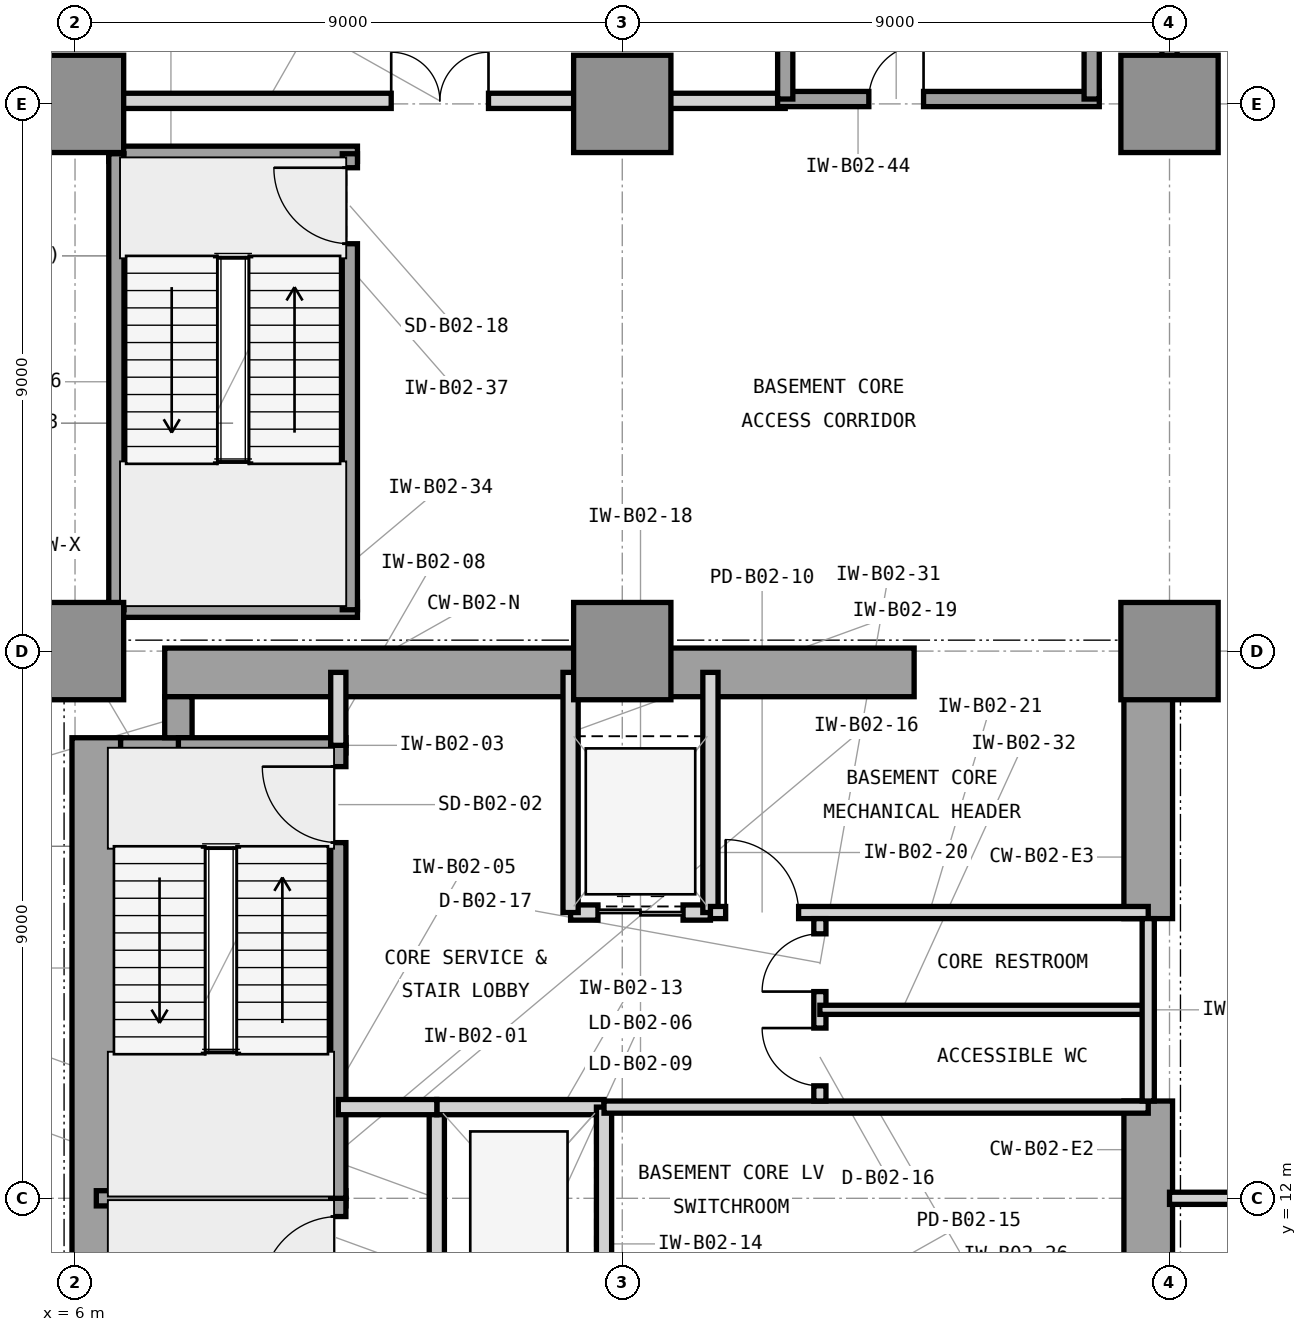
"""IFC4 building model, lengths in metres.
Left out: names, types, materials, properties, quantities, classifications, styles, units other than length and angle.
Written with IfcOpenShell. Run it as: python <this file> out.ifc"""

import sys

from ifc_helpers import new_model, si_unit, direction, frame, frame_2d, origin, origin_2d, place, context, subcontext, project, spatial, rectangle, extrude, element, fill, save


model = new_model("IFC4")
c1 = context("Model", 3, precision=1e-05, world=origin(), true_north=direction((0.0, 1.0)))
c2 = subcontext(c1, "Body", "Model", "MODEL_VIEW")
j1 = project(units=[si_unit("LENGTHUNIT", "METRE"), si_unit("PLANEANGLEUNIT", "RADIAN")], contexts=[c1])
p1 = place(None, origin())
s1 = spatial("IfcSite", under=j1, at=p1, CompositionType="ELEMENT")
p2 = place(p1, origin())
s2 = spatial("IfcBuilding", under=s1, at=p2, CompositionType="ELEMENT")
p3 = place(p2, frame((0.0, 0.0, -9.0)))
s3 = spatial("IfcBuildingStorey", under=s2, at=p3, CompositionType="ELEMENT", Elevation=-9.0)
p4 = place(p3, frame((6.35, 4.425, 0.0), z_axis=(0.0, 0.0, 1.0), x_axis=(0.0, 1.0, 0.0)))
e1 = element("IfcWall", 1, at=p4, inside=s3, PredefinedType="SHEAR", context=c2, shape_type="SweptSolid", body=[
    extrude(rectangle(XDim=15.15, YDim=0.8, at=frame_2d((7.575, 0.0))), origin(), (0.0, 0.0, 1.0), 4.5),
])
p5 = place(p3, frame((7.475, 20.65, 0.0), z_axis=(0.0, 0.0, 1.0), x_axis=(1.0, 0.0, 0.0)))
e2 = element("IfcWall", 2, at=p5, inside=s3, PredefinedType="SHEAR", context=c2, shape_type="SweptSolid", body=[
    extrude(rectangle(XDim=12.325, YDim=0.8, at=frame_2d((6.163, 0.0))), origin(), (0.0, 0.0, 1.0), 4.5),
])
p6 = place(p3, frame((23.65, 10.4, 0.0), z_axis=(0.0, 0.0, 1.0), x_axis=(0.0, 1.0, 0.0)))
e3 = element("IfcWall", 3, at=p6, inside=s3, PredefinedType="SHEAR", context=c2, shape_type="SweptSolid", body=[
    extrude(rectangle(XDim=3.2, YDim=0.8, at=frame_2d((1.6, 0.0))), origin(), (0.0, 0.0, 1.0), 4.5),
])
p7 = place(p3, frame((23.65, 16.6, 0.0), z_axis=(0.0, 0.0, 1.0), x_axis=(0.0, 1.0, 0.0)))
e4 = element("IfcWall", 4, at=p7, inside=s3, PredefinedType="SHEAR", context=c2, shape_type="SweptSolid", body=[
    extrude(rectangle(XDim=4.05, YDim=0.8, at=frame_2d((2.025, 0.0))), origin(), (0.0, 0.0, 1.0), 4.5),
])
p8 = place(p3, frame((6.75, 19.35, 0.0), z_axis=(0.0, 0.0, 1.0), x_axis=(1.0, 0.0, 0.0)))
e5 = element("IfcWall", 5, at=p8, inside=s3, PredefinedType="SHEAR", context=c2, shape_type="SweptSolid", body=[
    extrude(rectangle(XDim=1.175, YDim=0.45, at=frame_2d((0.587, 0.0))), origin(), (0.0, 0.0, 1.0), 4.5),
])
p9 = place(p3, frame((7.7, 19.575, 0.0), z_axis=(0.0, 0.0, 1.0), x_axis=(0.0, 1.0, 0.0)))
e6 = element("IfcWall", 6, at=p9, inside=s3, PredefinedType="SHEAR", context=c2, shape_type="SweptSolid", body=[
    extrude(rectangle(XDim=0.675, YDim=0.45, at=frame_2d((0.337, 0.0))), origin(), (0.0, 0.0, 1.0), 4.5),
])
for number, where, z_axis, x_axis in (
    (7, (6.0, 21.0, 0.0), (0.0, 0.0, 1.0), (1.0, 0.0, 0.0)),
    (8, (6.0, 30.0, 0.0), (0.0, 0.0, 1.0), (1.0, 0.0, 0.0)),
    (9, (15.0, 21.0, 0.0), (0.0, 0.0, 1.0), (1.0, 0.0, 0.0)),
    (10, (15.0, 30.0, 0.0), (0.0, 0.0, 1.0), (1.0, 0.0, 0.0)),
    (11, (24.0, 21.0, 0.0), (0.0, 0.0, 1.0), (1.0, 0.0, 0.0)),
    (12, (24.0, 30.0, 0.0), (0.0, 0.0, 1.0), (1.0, 0.0, 0.0)),
):
    element("IfcColumn", number, at=place(p3, frame(where, z_axis=z_axis, x_axis=x_axis)), inside=s3, PredefinedType="COLUMN", context=c2, shape_type="SweptSolid", body=[
        extrude(rectangle(XDim=1.6, YDim=1.6, at=origin_2d()), origin(), (0.0, 0.0, 1.0), 4.5),
    ])
p10 = place(p3, frame((6.35, 12.0, 0.0), z_axis=(0.0, 0.0, 1.0), x_axis=(1.0, 0.0, 0.0)))
e13 = element("IfcWall", 13, at=p10, inside=s3, PredefinedType="SHEAR", context=c2, shape_type="SweptSolid", body=[
    extrude(rectangle(XDim=4.105, YDim=0.25, at=frame_2d((2.052, 0.0))), origin(), (0.0, 0.0, 1.0), 4.5),
])
p11 = place(p3, frame((7.7, 19.45, 0.0), z_axis=(0.0, 0.0, 1.0), x_axis=(1.0, 0.0, 0.0)))
e14 = element("IfcWall", 14, at=p11, inside=s3, PredefinedType="SHEAR", context=c2, shape_type="SweptSolid", body=[
    extrude(rectangle(XDim=2.755, YDim=0.25, at=frame_2d((1.377, 0.0))), origin(), (0.0, 0.0, 1.0), 4.5),
])
p12 = place(p3, frame((10.33, 4.55, 0.0), z_axis=(0.0, 0.0, 1.0), x_axis=(0.0, 1.0, 0.0)))
e15 = element("IfcWall", 15, at=p12, inside=s3, PredefinedType="SHEAR", context=c2, shape_type="SweptSolid", body=[
    extrude(rectangle(XDim=7.45, YDim=0.25, at=frame_2d((3.725, 0.0))), origin(), (0.0, 0.0, 1.0), 4.5),
])
p13 = place(p12, frame((5.9, 0.0, 0.0)))
e16 = element("IfcOpeningElement", 16, at=p13, cuts=e15, PredefinedType="OPENING", context=c2, shape_type="SweptSolid", body=[
    extrude(rectangle(XDim=1.25, YDim=2.2, at=frame_2d((0.625, 1.1))), frame((0.0, 0.135, 0.0), z_axis=(0.0, -1.0, 0.0), x_axis=(1.0, 0.0, 0.0)), (0.0, 0.0, 1.0), 0.27),
])
p14 = place(p3, frame((10.33, 12.0, 0.0), z_axis=(0.0, 0.0, 1.0), x_axis=(0.0, 1.0, 0.0)))
e17 = element("IfcWall", 17, at=p14, inside=s3, PredefinedType="SHEAR", context=c2, shape_type="SweptSolid", body=[
    extrude(rectangle(XDim=7.45, YDim=0.25, at=frame_2d((3.725, 0.0))), origin(), (0.0, 0.0, 1.0), 4.5),
])
p15 = place(p14, frame((5.85, 0.0, 0.0)))
e18 = element("IfcOpeningElement", 18, at=p15, cuts=e17, PredefinedType="OPENING", context=c2, shape_type="SweptSolid", body=[
    extrude(rectangle(XDim=1.25, YDim=2.2, at=frame_2d((0.625, 1.1))), frame((0.0, 0.135, 0.0), z_axis=(0.0, -1.0, 0.0), x_axis=(1.0, 0.0, 0.0)), (0.0, 0.0, 1.0), 0.27),
])
p16 = place(p3, frame((10.33, 19.45, 0.0), z_axis=(0.0, 0.0, 1.0), x_axis=(0.0, 1.0, 0.0)))
e19 = element("IfcWall", 19, at=p16, inside=s3, PredefinedType="PARTITIONING", context=c2, shape_type="SweptSolid", body=[
    extrude(rectangle(XDim=1.2, YDim=0.25, at=frame_2d((0.6, 0.0))), origin(), (0.0, 0.0, 1.0), 3.2),
])
p17 = place(p3, frame((11.95, 10.5, 0.0), z_axis=(0.0, 0.0, 1.0), x_axis=(0.0, 1.0, 0.0)))
e20 = element("IfcWall", 20, at=p17, inside=s3, PredefinedType="PARTITIONING", context=c2, shape_type="SweptSolid", body=[
    extrude(rectangle(XDim=3.0, YDim=0.25, at=frame_2d((1.5, 0.0))), origin(), (0.0, 0.0, 1.0), 4.14),
])
p18 = place(p3, frame((11.95, 13.5, 0.0), z_axis=(0.0, 0.0, 1.0), x_axis=(1.0, 0.0, 0.0)))
e21 = element("IfcWall", 21, at=p18, inside=s3, PredefinedType="PARTITIONING", context=c2, shape_type="SweptSolid", body=[
    extrude(rectangle(XDim=2.75, YDim=0.25, at=frame_2d((1.375, 0.0))), origin(), (0.0, 0.0, 1.0), 3.523),
])
p19 = place(p3, frame((14.7, 10.5, 0.0), z_axis=(0.0, 0.0, 1.0), x_axis=(0.0, 1.0, 0.0)))
e22 = element("IfcWall", 22, at=p19, inside=s3, PredefinedType="PARTITIONING", context=c2, shape_type="SweptSolid", body=[
    extrude(rectangle(XDim=3.0, YDim=0.25, at=frame_2d((1.5, 0.0))), origin(), (0.0, 0.0, 1.0), 4.14),
])
p20 = place(p3, frame((10.33, 13.5, 0.0), z_axis=(0.0, 0.0, 1.0), x_axis=(1.0, 0.0, 0.0)))
e23 = element("IfcWall", 23, at=p20, inside=s3, PredefinedType="PARTITIONING", context=c2, shape_type="SweptSolid", body=[
    extrude(rectangle(XDim=1.62, YDim=0.25, at=frame_2d((0.81, 0.0))), origin(), (0.0, 0.0, 1.0), 3.523),
])
p21 = place(p3, frame((14.15, 16.7, 0.0), z_axis=(0.0, 0.0, 1.0), x_axis=(1.0, 0.0, 0.0)))
e24 = element("IfcWall", 24, at=p21, inside=s3, PredefinedType="PARTITIONING", context=c2, shape_type="SweptSolid", body=[
    extrude(rectangle(XDim=2.3, YDim=0.25, at=frame_2d((1.15, 0.0))), origin(), (0.0, 0.0, 1.0), 3.523),
])
p22 = place(p21, frame((0.45, 0.0, 0.0)))
e25 = element("IfcOpeningElement", 25, at=p22, cuts=e24, PredefinedType="OPENING", context=c2, shape_type="SweptSolid", body=[
    extrude(rectangle(XDim=1.4, YDim=2.35, at=frame_2d((0.7, 1.175))), frame((0.0, 0.135, 0.0), z_axis=(0.0, -1.0, 0.0), x_axis=(1.0, 0.0, 0.0)), (0.0, 0.0, 1.0), 0.27),
])
for number, where, z_axis, x_axis in (
    (26, (14.15, 16.7, 0.0), (0.0, 0.0, 1.0), (0.0, 1.0, 0.0)),
    (27, (16.45, 16.7, 0.0), (0.0, 0.0, 1.0), (0.0, 1.0, 0.0)),
):
    element("IfcWall", number, at=place(p3, frame(where, z_axis=z_axis, x_axis=x_axis)), inside=s3, PredefinedType="PARTITIONING", context=c2, shape_type="SweptSolid", body=[
        extrude(rectangle(XDim=3.95, YDim=0.25, at=frame_2d((1.975, 0.0))), origin(), (0.0, 0.0, 1.0), 4.14),
    ])
p23 = place(p3, frame((16.45, 16.7, 0.0), z_axis=(0.0, 0.0, 1.0), x_axis=(1.0, 0.0, 0.0)))
e28 = element("IfcWall", 28, at=p23, inside=s3, PredefinedType="PARTITIONING", context=c2, shape_type="SweptSolid", body=[
    extrude(rectangle(XDim=7.2, YDim=0.2, at=frame_2d((3.6, 0.0))), origin(), (0.0, 0.0, 1.0), 3.523),
])
p24 = place(p23, frame((0.25, 0.0, 0.0)))
e29 = element("IfcOpeningElement", 29, at=p24, cuts=e28, PredefinedType="OPENING", context=c2, shape_type="SweptSolid", body=[
    extrude(rectangle(XDim=1.2, YDim=2.2, at=frame_2d((0.6, 1.1))), frame((0.0, 0.11, 0.0), z_axis=(0.0, -1.0, 0.0), x_axis=(1.0, 0.0, 0.0)), (0.0, 0.0, 1.0), 0.22),
])
p25 = place(p3, frame((14.7, 13.5, 0.0), z_axis=(0.0, 0.0, 1.0), x_axis=(1.0, 0.0, 0.0)))
e30 = element("IfcWall", 30, at=p25, inside=s3, PredefinedType="PARTITIONING", context=c2, shape_type="SweptSolid", body=[
    extrude(rectangle(XDim=8.95, YDim=0.2, at=frame_2d((4.475, 0.0))), origin(), (0.0, 0.0, 1.0), 3.523),
])
p26 = place(p3, frame((18.25, 13.6, 0.0), z_axis=(0.0, 0.0, 1.0), x_axis=(0.0, 1.0, 0.0)))
e31 = element("IfcWall", 31, at=p26, inside=s3, PredefinedType="PARTITIONING", context=c2, shape_type="SweptSolid", body=[
    extrude(rectangle(XDim=3.0, YDim=0.2, at=frame_2d((1.5, 0.0))), origin(), (0.0, 0.0, 1.0), 4.14),
])
p27 = place(p26, frame((0.25, 0.0, 0.0)))
e32 = element("IfcOpeningElement", 32, at=p27, cuts=e31, PredefinedType="OPENING", context=c2, shape_type="SweptSolid", body=[
    extrude(rectangle(XDim=0.95, YDim=2.1, at=frame_2d((0.475, 1.05))), frame((0.0, 0.11, 0.0), z_axis=(0.0, -1.0, 0.0), x_axis=(1.0, 0.0, 0.0)), (0.0, 0.0, 1.0), 0.22),
])
p28 = place(p26, frame((1.8, 0.0, 0.0)))
e33 = element("IfcOpeningElement", 33, at=p28, cuts=e31, PredefinedType="OPENING", context=c2, shape_type="SweptSolid", body=[
    extrude(rectangle(XDim=0.95, YDim=2.1, at=frame_2d((0.475, 1.05))), frame((0.0, 0.11, 0.0), z_axis=(0.0, -1.0, 0.0), x_axis=(1.0, 0.0, 0.0)), (0.0, 0.0, 1.0), 0.22),
])
p29 = place(p3, frame((18.25, 15.1, 0.0), z_axis=(0.0, 0.0, 1.0), x_axis=(1.0, 0.0, 0.0)))
e34 = element("IfcWall", 34, at=p29, inside=s3, PredefinedType="PARTITIONING", context=c2, shape_type="SweptSolid", body=[
    extrude(rectangle(XDim=5.4, YDim=0.15, at=frame_2d((2.7, 0.0))), origin(), (0.0, 0.0, 1.0), 4.14),
])
p30 = place(p3, frame((23.65, 13.6, 0.0), z_axis=(0.0, 0.0, 1.0), x_axis=(0.0, 1.0, 0.0)))
e35 = element("IfcWall", 35, at=p30, inside=s3, PredefinedType="PARTITIONING", context=c2, shape_type="SweptSolid", body=[
    extrude(rectangle(XDim=3.0, YDim=0.2, at=frame_2d((1.5, 0.0))), origin(), (0.0, 0.0, 1.0), 4.14),
])
for number, where, z_axis, x_axis in (
    (36, (6.555, 21.68, 0.0), (0.0, 0.0, 1.0), (1.0, 0.0, 0.0)),
    (37, (6.555, 29.18, 0.0), (0.0, 0.0, 1.0), (1.0, 0.0, 0.0)),
):
    element("IfcWall", number, at=place(p3, frame(where, z_axis=z_axis, x_axis=x_axis)), inside=s3, PredefinedType="SHEAR", context=c2, shape_type="SweptSolid", body=[
        extrude(rectangle(XDim=4.09, YDim=0.25, at=frame_2d((2.045, 0.0))), origin(), (0.0, 0.0, 1.0), 4.5),
    ])
p31 = place(p3, frame((6.68, 21.68, 0.0), z_axis=(0.0, 0.0, 1.0), x_axis=(0.0, 1.0, 0.0)))
e38 = element("IfcWall", 38, at=p31, inside=s3, PredefinedType="SHEAR", context=c2, shape_type="SweptSolid", body=[
    extrude(rectangle(XDim=7.5, YDim=0.25, at=frame_2d((3.75, 0.0))), origin(), (0.0, 0.0, 1.0), 4.5),
])
p32 = place(p3, frame((10.52, 21.68, 0.0), z_axis=(0.0, 0.0, 1.0), x_axis=(0.0, 1.0, 0.0)))
e39 = element("IfcWall", 39, at=p32, inside=s3, PredefinedType="SHEAR", context=c2, shape_type="SweptSolid", body=[
    extrude(rectangle(XDim=7.5, YDim=0.25, at=frame_2d((3.75, 0.0))), origin(), (0.0, 0.0, 1.0), 4.5),
])
p33 = place(p32, frame((6.02, 0.0, 0.0)))
e40 = element("IfcOpeningElement", 40, at=p33, cuts=e39, PredefinedType="OPENING", context=c2, shape_type="SweptSolid", body=[
    extrude(rectangle(XDim=1.25, YDim=2.2, at=frame_2d((0.625, 1.1))), frame((0.0, 0.135, 0.0), z_axis=(0.0, -1.0, 0.0), x_axis=(1.0, 0.0, 0.0)), (0.0, 0.0, 1.0), 0.27),
])
p34 = place(p3, frame((0.65, 30.05, 0.0), z_axis=(0.0, 0.0, 1.0), x_axis=(1.0, 0.0, 0.0)))
e41 = element("IfcWall", 41, at=p34, inside=s3, PredefinedType="PARTITIONING", context=c2, shape_type="SweptSolid", body=[
    extrude(rectangle(XDim=17.03, YDim=0.25, at=frame_2d((8.515, 0.0))), origin(), (0.0, 0.0, 1.0), 3.2),
])
p35 = place(p34, frame((10.55, 0.0, 0.0)))
e42 = element("IfcOpeningElement", 42, at=p35, cuts=e41, PredefinedType="OPENING", context=c2, shape_type="SweptSolid", body=[
    extrude(rectangle(XDim=1.6, YDim=2.3, at=frame_2d((0.8, 1.15))), frame((0.0, 0.135, 0.0), z_axis=(0.0, -1.0, 0.0), x_axis=(1.0, 0.0, 0.0)), (0.0, 0.0, 1.0), 0.27),
])
p36 = place(p3, frame((24.0, 30.05, 0.0), z_axis=(0.0, 0.0, 1.0), x_axis=(0.0, 1.0, 0.0)))
e43 = element("IfcWall", 43, at=p36, inside=s3, PredefinedType="PARTITIONING", context=c2, shape_type="SweptSolid", body=[
    extrude(rectangle(XDim=20.3, YDim=0.25, at=frame_2d((10.15, 0.0))), origin(), (0.0, 0.0, 1.0), 3.2),
])
p37 = place(p3, frame((17.555, 30.08, 0.0), z_axis=(0.0, 0.0, 1.0), x_axis=(1.0, 0.0, 0.0)))
e44 = element("IfcWall", 44, at=p37, inside=s3, PredefinedType="SHEAR", context=c2, shape_type="SweptSolid", body=[
    extrude(rectangle(XDim=5.29, YDim=0.25, at=frame_2d((2.645, 0.0))), origin(), (0.0, 0.0, 1.0), 4.5),
])
p38 = place(p37, frame((1.5, 0.0, 0.0)))
e45 = element("IfcOpeningElement", 45, at=p38, cuts=e44, PredefinedType="OPENING", context=c2, shape_type="SweptSolid", body=[
    extrude(rectangle(XDim=0.9, YDim=2.1, at=frame_2d((0.45, 1.05))), frame((0.0, 0.135, 0.0), z_axis=(0.0, -1.0, 0.0), x_axis=(1.0, 0.0, 0.0)), (0.0, 0.0, 1.0), 0.27),
])
for number, where, z_axis, x_axis in (
    (46, (17.68, 30.08, 0.0), (0.0, 0.0, 1.0), (0.0, 1.0, 0.0)),
    (47, (22.72, 30.08, 0.0), (0.0, 0.0, 1.0), (0.0, 1.0, 0.0)),
):
    element("IfcWall", number, at=place(p3, frame(where, z_axis=z_axis, x_axis=x_axis)), inside=s3, PredefinedType="SHEAR", context=c2, shape_type="SweptSolid", body=[
        extrude(rectangle(XDim=8.79, YDim=0.25, at=frame_2d((4.395, 0.0))), origin(), (0.0, 0.0, 1.0), 4.5),
    ])
p39 = place(p3, frame((24.0, 12.0, 0.0), z_axis=(0.0, 0.0, 1.0), x_axis=(1.0, 0.0, 0.0)))
e48 = element("IfcWall", 48, at=p39, inside=s3, PredefinedType="PARTITIONING", context=c2, shape_type="SweptSolid", body=[
    extrude(rectangle(XDim=21.0, YDim=0.2, at=frame_2d((10.5, 0.0))), origin(), (0.0, 0.0, 1.0), 3.2),
])
p40 = place(p39, frame((12.0, 0.0, 0.0)))
e49 = element("IfcOpeningElement", 49, at=p40, cuts=e48, PredefinedType="OPENING", context=c2, shape_type="SweptSolid", body=[
    extrude(rectangle(XDim=1.6, YDim=2.3, at=frame_2d((0.8, 1.15))), frame((0.0, 0.11, 0.0), z_axis=(0.0, -1.0, 0.0), x_axis=(1.0, 0.0, 0.0)), (0.0, 0.0, 1.0), 0.22),
])
p41 = place(p13, origin())
e50 = element("IfcDoor", 50, at=p41, inside=s3, OperationType="SINGLE_SWING_LEFT", PredefinedType="DOOR", context=c2, shape_type="SweptSolid", body=[
    extrude(rectangle(XDim=1.25, YDim=2.2, at=frame_2d((0.625, 1.1))), frame((0.0, 0.025, 0.0), z_axis=(0.0, -1.0, 0.0), x_axis=(1.0, 0.0, 0.0)), (0.0, 0.0, 1.0), 0.05),
])
fill(e16, e50)
p42 = place(p15, origin())
e51 = element("IfcDoor", 51, at=p42, inside=s3, OperationType="SINGLE_SWING_RIGHT", PredefinedType="DOOR", context=c2, shape_type="SweptSolid", body=[
    extrude(rectangle(XDim=1.25, YDim=2.2, at=frame_2d((0.625, 1.1))), frame((0.0, 0.025, 0.0), z_axis=(0.0, -1.0, 0.0), x_axis=(1.0, 0.0, 0.0)), (0.0, 0.0, 1.0), 0.05),
])
fill(e18, e51)
p43 = place(p22, origin())
e52 = element("IfcDoor", 52, at=p43, inside=s3, OperationType="DOUBLE_DOOR_SLIDING", PredefinedType="DOOR", context=c2, shape_type="SweptSolid", body=[
    extrude(rectangle(XDim=1.4, YDim=2.35, at=frame_2d((0.7, 1.175))), frame((0.0, 0.025, 0.0), z_axis=(0.0, -1.0, 0.0), x_axis=(1.0, 0.0, 0.0)), (0.0, 0.0, 1.0), 0.05),
])
fill(e25, e52)
p44 = place(p24, origin())
e53 = element("IfcDoor", 53, at=p44, inside=s3, OperationType="SINGLE_SWING_LEFT", PredefinedType="DOOR", context=c2, shape_type="SweptSolid", body=[
    extrude(rectangle(XDim=1.2, YDim=2.2, at=frame_2d((0.6, 1.1))), frame((0.0, 0.025, 0.0), z_axis=(0.0, -1.0, 0.0), x_axis=(1.0, 0.0, 0.0)), (0.0, 0.0, 1.0), 0.05),
])
fill(e29, e53)
p45 = place(p27, origin())
e54 = element("IfcDoor", 54, at=p45, inside=s3, OperationType="SINGLE_SWING_RIGHT", PredefinedType="DOOR", context=c2, shape_type="SweptSolid", body=[
    extrude(rectangle(XDim=0.95, YDim=2.1, at=frame_2d((0.475, 1.05))), frame((0.0, 0.025, 0.0), z_axis=(0.0, -1.0, 0.0), x_axis=(1.0, 0.0, 0.0)), (0.0, 0.0, 1.0), 0.05),
])
fill(e32, e54)
p46 = place(p28, origin())
e55 = element("IfcDoor", 55, at=p46, inside=s3, OperationType="SINGLE_SWING_LEFT", PredefinedType="DOOR", context=c2, shape_type="SweptSolid", body=[
    extrude(rectangle(XDim=0.95, YDim=2.1, at=frame_2d((0.475, 1.05))), frame((0.0, 0.025, 0.0), z_axis=(0.0, -1.0, 0.0), x_axis=(1.0, 0.0, 0.0)), (0.0, 0.0, 1.0), 0.05),
])
fill(e33, e55)
p47 = place(p33, origin())
e56 = element("IfcDoor", 56, at=p47, inside=s3, OperationType="SINGLE_SWING_RIGHT", PredefinedType="DOOR", context=c2, shape_type="SweptSolid", body=[
    extrude(rectangle(XDim=1.25, YDim=2.2, at=frame_2d((0.625, 1.1))), frame((0.0, 0.025, 0.0), z_axis=(0.0, -1.0, 0.0), x_axis=(1.0, 0.0, 0.0)), (0.0, 0.0, 1.0), 0.05),
])
fill(e40, e56)
p48 = place(p35, origin())
e57 = element("IfcDoor", 57, at=p48, inside=s3, OperationType="DOUBLE_DOOR_SINGLE_SWING", PredefinedType="DOOR", context=c2, shape_type="SweptSolid", body=[
    extrude(rectangle(XDim=1.6, YDim=2.3, at=frame_2d((0.8, 1.15))), frame((0.0, 0.025, 0.0), z_axis=(0.0, -1.0, 0.0), x_axis=(1.0, 0.0, 0.0)), (0.0, 0.0, 1.0), 0.05),
])
fill(e42, e57)
p49 = place(p38, origin())
e58 = element("IfcDoor", 58, at=p49, inside=s3, OperationType="SINGLE_SWING_RIGHT", PredefinedType="TRAPDOOR", context=c2, shape_type="SweptSolid", body=[
    extrude(rectangle(XDim=0.9, YDim=2.1, at=frame_2d((0.45, 1.05))), frame((0.0, 0.025, 0.0), z_axis=(0.0, -1.0, 0.0), x_axis=(1.0, 0.0, 0.0)), (0.0, 0.0, 1.0), 0.05),
])
fill(e45, e58)
save(model, sys.argv[1])
